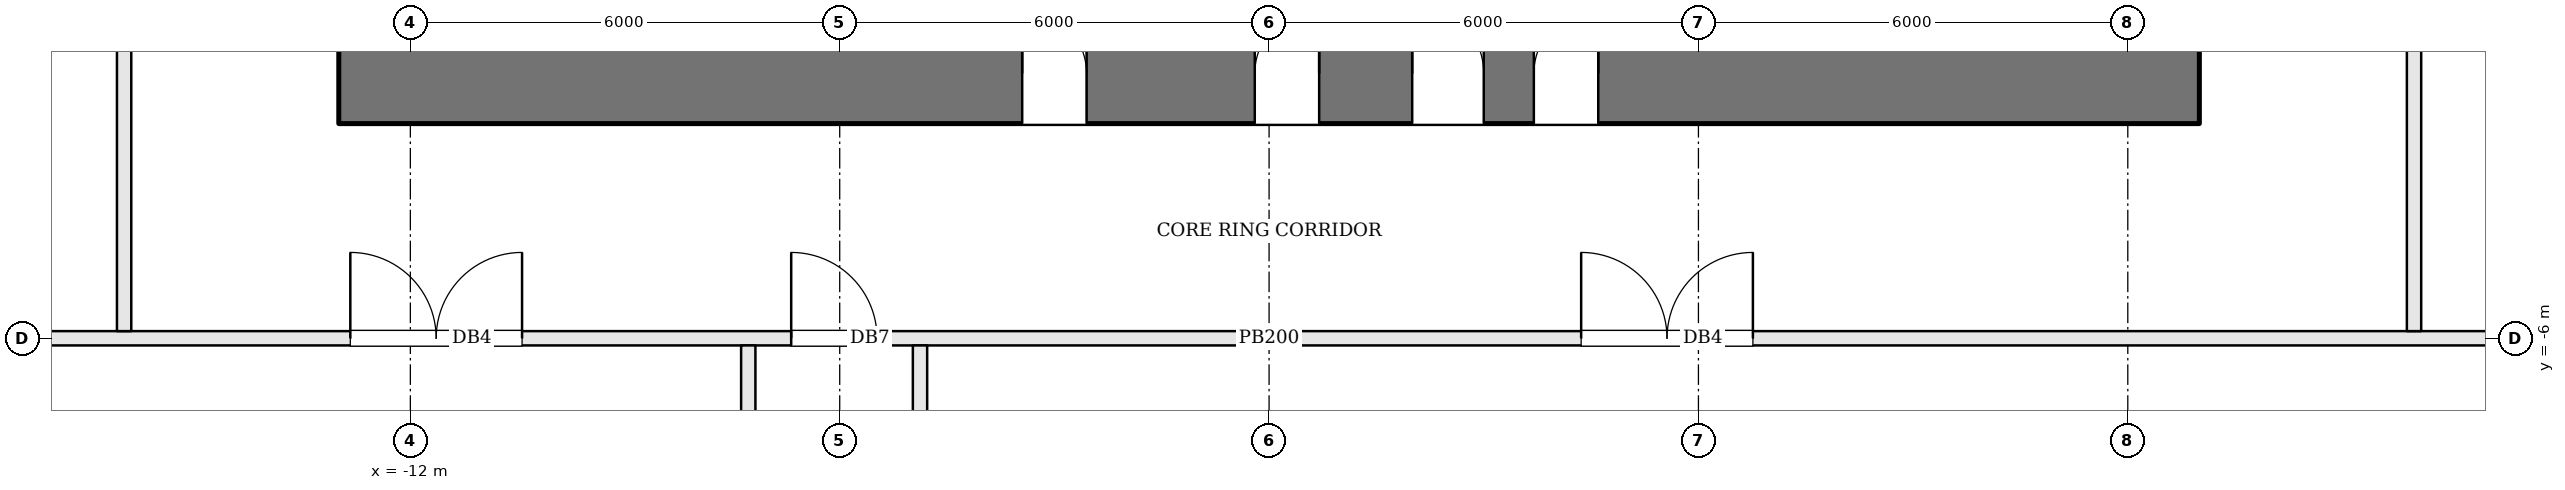
"""IFC4 building model, lengths in metres.
Left out: names, types, materials, properties, quantities, classifications, styles, units other than length and angle.
Written with IfcOpenShell. Run it as: python <this file> out.ifc"""

import sys

from ifc_helpers import new_model, si_unit, direction, frame, frame_2d, origin, place, context, subcontext, project, spatial, rectangle, extrude, element, fill, save


model = new_model("IFC4")
c1 = context("Model", 3, precision=1e-05, world=origin(), true_north=direction((0.0, 1.0)))
c2 = subcontext(c1, "Body", "Model", "MODEL_VIEW")
j1 = project(units=[si_unit("LENGTHUNIT", "METRE"), si_unit("PLANEANGLEUNIT", "RADIAN")], contexts=[c1])
p1 = place(None, origin())
s1 = spatial("IfcSite", under=j1, at=p1, CompositionType="ELEMENT")
p2 = place(p1, origin())
s2 = spatial("IfcBuilding", under=s1, at=p2, CompositionType="ELEMENT")
p3 = place(p2, frame((0.0, 0.0, 7.2)))
s3 = spatial("IfcBuildingStorey", under=s2, at=p3, CompositionType="ELEMENT", Elevation=7.2)
p4 = place(p3, frame((-13.0, -2.3, 0.0), z_axis=(0.0, 0.0, 1.0), x_axis=(1.0, 0.0, 0.0)))
e1 = element("IfcWall", 1, at=p4, inside=s3, PredefinedType="SHEAR", context=c2, shape_type="SweptSolid", body=[
    extrude(rectangle(XDim=26.0, YDim=1.4, at=frame_2d((13.0, 0.0))), origin(), (0.0, 0.0, 1.0), 7.8),
])
p5 = place(p4, frame((9.55, 0.0, 0.0)))
e2 = element("IfcOpeningElement", 2, at=p5, cuts=e1, PredefinedType="OPENING", context=c2, shape_type="SweptSolid", body=[
    extrude(rectangle(XDim=0.9, YDim=2.1, at=frame_2d((0.45, 1.05))), frame((0.0, 0.71, 0.0), z_axis=(0.0, -1.0, 0.0), x_axis=(1.0, 0.0, 0.0)), (0.0, 0.0, 1.0), 1.42),
])
p6 = place(p4, frame((12.8, 0.0, 0.0)))
e3 = element("IfcOpeningElement", 3, at=p6, cuts=e1, PredefinedType="OPENING", context=c2, shape_type="SweptSolid", body=[
    extrude(rectangle(XDim=0.9, YDim=2.1, at=frame_2d((0.45, 1.05))), frame((0.0, 0.71, 0.0), z_axis=(0.0, -1.0, 0.0), x_axis=(1.0, 0.0, 0.0)), (0.0, 0.0, 1.0), 1.42),
])
p7 = place(p4, frame((15.0, 0.0, 0.0)))
e4 = element("IfcOpeningElement", 4, at=p7, cuts=e1, PredefinedType="OPENING", context=c2, shape_type="SweptSolid", body=[
    extrude(rectangle(XDim=1.0, YDim=2.1, at=frame_2d((0.5, 1.05))), frame((0.0, 0.71, 0.0), z_axis=(0.0, -1.0, 0.0), x_axis=(1.0, 0.0, 0.0)), (0.0, 0.0, 1.0), 1.42),
])
p8 = place(p4, frame((16.7, 0.0, 0.0)))
e5 = element("IfcOpeningElement", 5, at=p8, cuts=e1, PredefinedType="OPENING", context=c2, shape_type="SweptSolid", body=[
    extrude(rectangle(XDim=0.9, YDim=2.1, at=frame_2d((0.45, 1.05))), frame((0.0, 0.71, 0.0), z_axis=(0.0, -1.0, 0.0), x_axis=(1.0, 0.0, 0.0)), (0.0, 0.0, 1.0), 1.42),
])
p9 = place(p3, frame((-19.85, -6.0, 0.0), z_axis=(0.0, 0.0, 1.0), x_axis=(1.0, 0.0, 0.0)))
e6 = element("IfcWall", 6, at=p9, inside=s3, PredefinedType="PARTITIONING", context=c2, shape_type="SweptSolid", body=[
    extrude(rectangle(XDim=39.7, YDim=0.2, at=frame_2d((19.85, 0.0))), origin(), (0.0, 0.0, 1.0), 6.83),
])
p10 = place(p9, frame((13.172, 0.0, 0.0)))
e7 = element("IfcOpeningElement", 7, at=p10, cuts=e6, PredefinedType="OPENING", context=c2, shape_type="SweptSolid", body=[
    extrude(rectangle(XDim=1.2, YDim=2.1, at=frame_2d((0.6, 1.05))), frame((0.0, 0.11, 0.0), z_axis=(0.0, -1.0, 0.0), x_axis=(1.0, 0.0, 0.0)), (0.0, 0.0, 1.0), 0.22),
])
p11 = place(p9, frame((24.211, 0.0, 0.0)))
e8 = element("IfcOpeningElement", 8, at=p11, cuts=e6, PredefinedType="OPENING", context=c2, shape_type="SweptSolid", body=[
    extrude(rectangle(XDim=2.4, YDim=2.4, at=frame_2d((1.2, 1.2))), frame((0.0, 0.11, 0.0), z_axis=(0.0, -1.0, 0.0), x_axis=(1.0, 0.0, 0.0)), (0.0, 0.0, 1.0), 0.22),
])
p12 = place(p9, frame((7.011, 0.0, 0.0)))
e9 = element("IfcOpeningElement", 9, at=p12, cuts=e6, PredefinedType="OPENING", context=c2, shape_type="SweptSolid", body=[
    extrude(rectangle(XDim=2.4, YDim=2.4, at=frame_2d((1.2, 1.2))), frame((0.0, 0.11, 0.0), z_axis=(0.0, -1.0, 0.0), x_axis=(1.0, 0.0, 0.0)), (0.0, 0.0, 1.0), 0.22),
])
p13 = place(p3, frame((-4.878, -6.1, 0.0), z_axis=(0.0, 0.0, 1.0), x_axis=(0.0, -1.0, 0.0)))
e10 = element("IfcWall", 10, at=p13, inside=s3, PredefinedType="PARTITIONING", context=c2, shape_type="SweptSolid", body=[
    extrude(rectangle(XDim=13.331, YDim=0.2, at=frame_2d((6.666, 0.0))), origin(), (0.0, 0.0, 1.0), 6.83),
])
p14 = place(p3, frame((-7.278, -19.231, 0.0), z_axis=(0.0, 0.0, 1.0), x_axis=(0.0, 1.0, 0.0)))
e11 = element("IfcWall", 11, at=p14, inside=s3, PredefinedType="PARTITIONING", context=c2, shape_type="SweptSolid", body=[
    extrude(rectangle(XDim=13.131, YDim=0.2, at=frame_2d((6.565, 0.0))), origin(), (0.0, 0.0, 1.0), 6.83),
])
p15 = place(p3, frame((-16.0, 14.9, 0.0), z_axis=(0.0, 0.0, 1.0), x_axis=(0.0, -1.0, 0.0)))
e12 = element("IfcWall", 12, at=p15, inside=s3, PredefinedType="PARTITIONING", context=c2, shape_type="SweptSolid", body=[
    extrude(rectangle(XDim=20.8, YDim=0.2, at=frame_2d((10.4, 0.0))), origin(), (0.0, 0.0, 1.0), 6.83),
])
p16 = place(p15, frame((9.9, 0.0, 0.0)))
e13 = element("IfcOpeningElement", 13, at=p16, cuts=e12, PredefinedType="OPENING", context=c2, shape_type="SweptSolid", body=[
    extrude(rectangle(XDim=1.0, YDim=2.1, at=frame_2d((0.5, 1.05))), frame((0.0, 0.11, 0.0), z_axis=(0.0, -1.0, 0.0), x_axis=(1.0, 0.0, 0.0)), (0.0, 0.0, 1.0), 0.22),
])
p17 = place(p3, frame((16.0, -5.9, 0.0), z_axis=(0.0, 0.0, 1.0), x_axis=(0.0, 1.0, 0.0)))
e14 = element("IfcWall", 14, at=p17, inside=s3, PredefinedType="PARTITIONING", context=c2, shape_type="SweptSolid", body=[
    extrude(rectangle(XDim=21.792, YDim=0.2, at=frame_2d((10.896, 0.0))), origin(), (0.0, 0.0, 1.0), 6.83),
])
p18 = place(p17, frame((9.9, 0.0, 0.0)))
e15 = element("IfcOpeningElement", 15, at=p18, cuts=e14, PredefinedType="OPENING", context=c2, shape_type="SweptSolid", body=[
    extrude(rectangle(XDim=1.0, YDim=2.1, at=frame_2d((0.5, 1.05))), frame((0.0, 0.11, 0.0), z_axis=(0.0, -1.0, 0.0), x_axis=(1.0, 0.0, 0.0)), (0.0, 0.0, 1.0), 0.22),
])
p19 = place(p5, origin())
e16 = element("IfcDoor", 16, at=p19, inside=s3, OperationType="SINGLE_SWING_LEFT", PredefinedType="DOOR", context=c2, shape_type="SweptSolid", body=[
    extrude(rectangle(XDim=0.9, YDim=2.1, at=frame_2d((0.45, 1.05))), frame((0.0, 0.025, 0.0), z_axis=(0.0, -1.0, 0.0), x_axis=(1.0, 0.0, 0.0)), (0.0, 0.0, 1.0), 0.05),
])
fill(e2, e16)
p20 = place(p6, origin())
e17 = element("IfcDoor", 17, at=p20, inside=s3, OperationType="SINGLE_SWING_RIGHT", PredefinedType="DOOR", context=c2, shape_type="SweptSolid", body=[
    extrude(rectangle(XDim=0.9, YDim=2.1, at=frame_2d((0.45, 1.05))), frame((0.0, 0.025, 0.0), z_axis=(0.0, -1.0, 0.0), x_axis=(1.0, 0.0, 0.0)), (0.0, 0.0, 1.0), 0.05),
])
fill(e3, e17)
p21 = place(p7, origin())
e18 = element("IfcDoor", 18, at=p21, inside=s3, OperationType="SINGLE_SWING_LEFT", PredefinedType="DOOR", context=c2, shape_type="SweptSolid", body=[
    extrude(rectangle(XDim=1.0, YDim=2.1, at=frame_2d((0.5, 1.05))), frame((0.0, 0.025, 0.0), z_axis=(0.0, -1.0, 0.0), x_axis=(1.0, 0.0, 0.0)), (0.0, 0.0, 1.0), 0.05),
])
fill(e4, e18)
p22 = place(p8, origin())
e19 = element("IfcDoor", 19, at=p22, inside=s3, OperationType="SINGLE_SWING_RIGHT", PredefinedType="DOOR", context=c2, shape_type="SweptSolid", body=[
    extrude(rectangle(XDim=0.9, YDim=2.1, at=frame_2d((0.45, 1.05))), frame((0.0, 0.025, 0.0), z_axis=(0.0, -1.0, 0.0), x_axis=(1.0, 0.0, 0.0)), (0.0, 0.0, 1.0), 0.05),
])
fill(e5, e19)
p23 = place(p10, origin())
e20 = element("IfcDoor", 20, at=p23, inside=s3, OperationType="SINGLE_SWING_LEFT", PredefinedType="DOOR", context=c2, shape_type="SweptSolid", body=[
    extrude(rectangle(XDim=1.2, YDim=2.1, at=frame_2d((0.6, 1.05))), frame((0.0, 0.025, 0.0), z_axis=(0.0, -1.0, 0.0), x_axis=(1.0, 0.0, 0.0)), (0.0, 0.0, 1.0), 0.05),
])
fill(e7, e20)
p24 = place(p11, origin())
e21 = element("IfcDoor", 21, at=p24, inside=s3, OperationType="DOUBLE_DOOR_SINGLE_SWING", PredefinedType="DOOR", context=c2, shape_type="SweptSolid", body=[
    extrude(rectangle(XDim=2.4, YDim=2.4, at=frame_2d((1.2, 1.2))), frame((0.0, 0.025, 0.0), z_axis=(0.0, -1.0, 0.0), x_axis=(1.0, 0.0, 0.0)), (0.0, 0.0, 1.0), 0.05),
])
fill(e8, e21)
p25 = place(p12, origin())
e22 = element("IfcDoor", 22, at=p25, inside=s3, OperationType="DOUBLE_DOOR_SINGLE_SWING", PredefinedType="DOOR", context=c2, shape_type="SweptSolid", body=[
    extrude(rectangle(XDim=2.4, YDim=2.4, at=frame_2d((1.2, 1.2))), frame((0.0, 0.025, 0.0), z_axis=(0.0, -1.0, 0.0), x_axis=(1.0, 0.0, 0.0)), (0.0, 0.0, 1.0), 0.05),
])
fill(e9, e22)
save(model, sys.argv[1])
